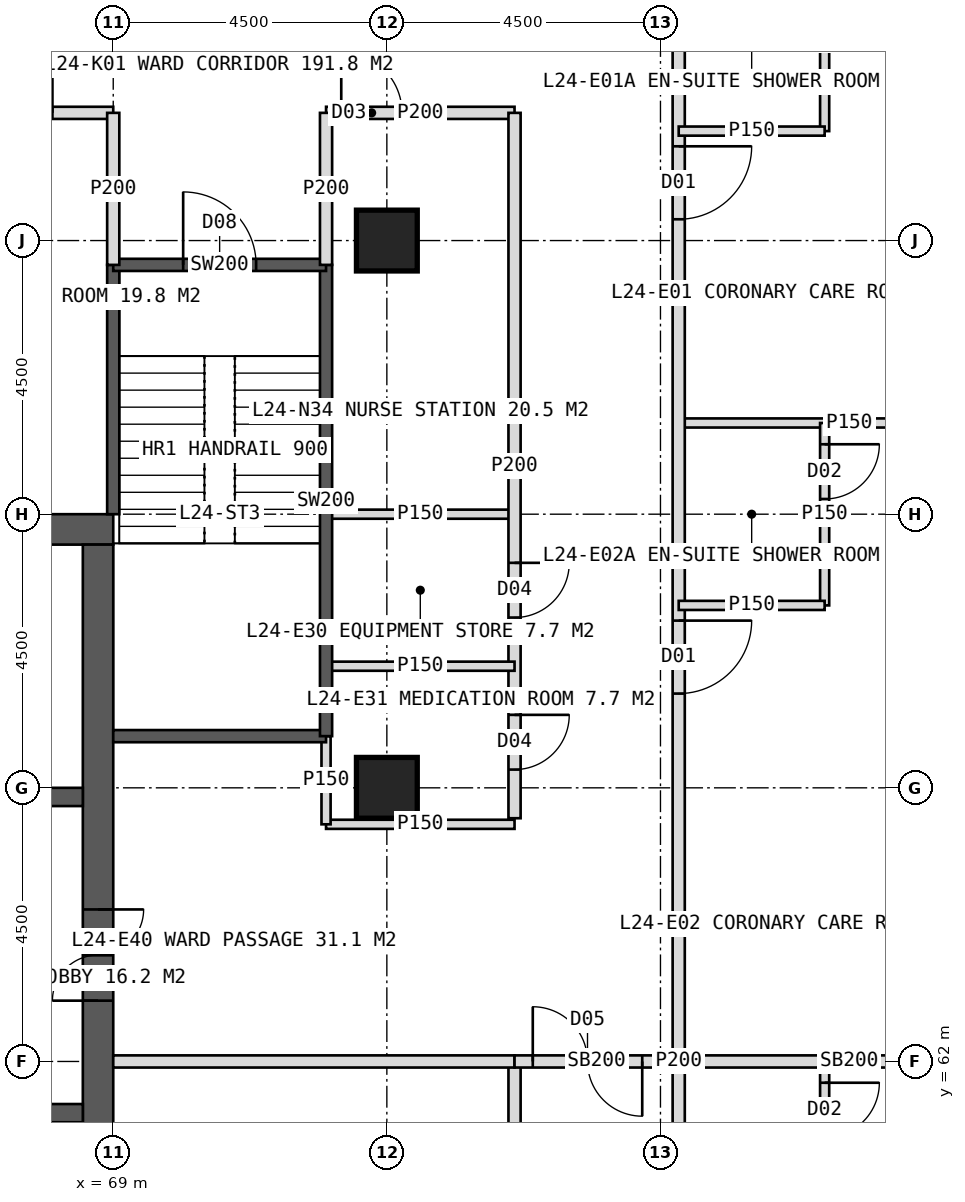
"""IFC4 building model, lengths in metres.
Left out: names, types, materials, properties, quantities, classifications, styles, units other than length and angle.
Written with IfcOpenShell. Run it as: python <this file> out.ifc"""

import sys

from ifc_helpers import new_model, si_unit, direction, frame, frame_2d, origin, origin_2d, place, context, subcontext, project, spatial, rectangle, hollow_rectangle, extrude, element, fill, save


model = new_model("IFC4")
c1 = context("Model", 3, precision=1e-05, world=origin(), true_north=direction((0.0, 1.0)))
c2 = subcontext(c1, "Body", "Model", "MODEL_VIEW")
j1 = project(units=[si_unit("LENGTHUNIT", "METRE"), si_unit("PLANEANGLEUNIT", "RADIAN")], contexts=[c1])
p1 = place(None, origin())
s1 = spatial("IfcSite", under=j1, at=p1, CompositionType="ELEMENT")
p2 = place(p1, origin())
s2 = spatial("IfcBuilding", under=s1, at=p2, CompositionType="ELEMENT")
p3 = place(p2, frame((0.0, 0.0, 104.0)))
s3 = spatial("IfcBuildingStorey", under=s2, at=p3, CompositionType="ELEMENT", Elevation=104.0)
p4 = place(p3, frame((51.0, 70.75, 0.0), z_axis=(0.0, 0.0, 1.0), x_axis=(1.0, 0.0, 0.0)))
e1 = element("IfcWall", 1, at=p4, inside=s3, PredefinedType="SHEAR", context=c2, shape_type="SweptSolid", body=[
    extrude(rectangle(XDim=18.0, YDim=0.5, at=frame_2d((9.0, 0.0))), origin(), (0.0, 0.0, 1.0), 4.0),
])
p5 = place(p4, frame((8.1, 0.0, 0.0)))
e2 = element("IfcOpeningElement", 2, at=p5, cuts=e1, PredefinedType="OPENING", context=c2, shape_type="SweptSolid", body=[
    extrude(rectangle(XDim=1.8, YDim=2.2, at=frame_2d((0.9, 1.1))), frame((0.0, 0.26, 0.0), z_axis=(0.0, -1.0, 0.0), x_axis=(1.0, 0.0, 0.0)), (0.0, 0.0, 1.0), 0.52),
])
p6 = place(p3, frame((68.75, 53.5, 0.0), z_axis=(0.0, 0.0, 1.0), x_axis=(0.0, 1.0, 0.0)))
e3 = element("IfcWall", 3, at=p6, inside=s3, PredefinedType="SHEAR", context=c2, shape_type="SweptSolid", body=[
    extrude(rectangle(XDim=17.0, YDim=0.5, at=frame_2d((8.5, 0.0))), origin(), (0.0, 0.0, 1.0), 4.0),
])
p7 = place(p6, frame((9.5, 0.0, 0.0)))
e4 = element("IfcOpeningElement", 4, at=p7, cuts=e3, PredefinedType="OPENING", context=c2, shape_type="SweptSolid", body=[
    extrude(rectangle(XDim=1.5, YDim=2.2, at=frame_2d((0.75, 1.1))), frame((0.0, 0.26, 0.0), z_axis=(0.0, -1.0, 0.0), x_axis=(1.0, 0.0, 0.0)), (0.0, 0.0, 1.0), 0.52),
])
p8 = place(p3, frame((65.2, 61.15, 0.0), z_axis=(0.0, 0.0, 1.0), x_axis=(1.0, 0.0, 0.0)))
e5 = element("IfcWall", 5, at=p8, inside=s3, PredefinedType="SHEAR", context=c2, shape_type="SweptSolid", body=[
    extrude(rectangle(XDim=3.3, YDim=0.3, at=frame_2d((1.65, 0.0))), origin(), (0.0, 0.0, 1.0), 4.0),
])
p9 = place(p8, frame((1.05, 0.0, 0.0)))
e6 = element("IfcOpeningElement", 6, at=p9, cuts=e5, PredefinedType="OPENING", context=c2, shape_type="SweptSolid", body=[
    extrude(rectangle(XDim=1.2, YDim=2.1, at=frame_2d((0.6, 1.05))), frame((0.0, 0.16, 0.0), z_axis=(0.0, -1.0, 0.0), x_axis=(1.0, 0.0, 0.0)), (0.0, 0.0, 1.0), 0.32),
])
p10 = place(p3, frame((65.2, 66.35, 0.0), z_axis=(0.0, 0.0, 1.0), x_axis=(1.0, 0.0, 0.0)))
e7 = element("IfcWall", 7, at=p10, inside=s3, PredefinedType="SHEAR", context=c2, shape_type="SweptSolid", body=[
    extrude(rectangle(XDim=3.3, YDim=0.3, at=frame_2d((1.65, 0.0))), origin(), (0.0, 0.0, 1.0), 4.0),
])
p11 = place(p10, frame((1.05, 0.0, 0.0)))
e8 = element("IfcOpeningElement", 8, at=p11, cuts=e7, PredefinedType="OPENING", context=c2, shape_type="SweptSolid", body=[
    extrude(rectangle(XDim=1.2, YDim=2.2, at=frame_2d((0.6, 1.1))), frame((0.0, 0.16, 0.0), z_axis=(0.0, -1.0, 0.0), x_axis=(1.0, 0.0, 0.0)), (0.0, 0.0, 1.0), 0.32),
])
for number, where, z_axis, x_axis in (
    (9, (73.5, 75.5, 0.0), (0.0, 0.0, 1.0), (1.0, 0.0, 0.0)),
    (10, (73.5, 66.5, 0.0), (0.0, 0.0, 1.0), (1.0, 0.0, 0.0)),
):
    element("IfcColumn", number, at=place(p3, frame(where, z_axis=z_axis, x_axis=x_axis)), inside=s3, PredefinedType="COLUMN", context=c2, shape_type="SweptSolid", body=[
        extrude(hollow_rectangle(XDim=1.0, YDim=1.0, WallThickness=0.1, at=origin_2d()), origin(), (0.0, 0.0, 1.0), 4.0),
    ])
p12 = place(p3, frame((62.25, 77.6, 0.0), z_axis=(0.0, 0.0, 1.0), x_axis=(1.0, 0.0, 0.0)))
e11 = element("IfcWall", 11, at=p12, inside=s3, PredefinedType="PARTITIONING", context=c2, shape_type="SweptSolid", body=[
    extrude(rectangle(XDim=6.75, YDim=0.2, at=frame_2d((3.375, 0.0))), origin(), (0.0, 0.0, 1.0), 3.75),
])
p13 = place(p12, frame((1.375, 0.0, 0.0)))
e12 = element("IfcOpeningElement", 12, at=p13, cuts=e11, PredefinedType="OPENING", context=c2, shape_type="SweptSolid", body=[
    extrude(rectangle(XDim=1.0, YDim=2.1, at=frame_2d((0.5, 1.05))), frame((0.0, 0.11, 0.0), z_axis=(0.0, -1.0, 0.0), x_axis=(1.0, 0.0, 0.0)), (0.0, 0.0, 1.0), 0.22),
])
p14 = place(p12, frame((4.75, 0.0, 0.0)))
e13 = element("IfcOpeningElement", 13, at=p14, cuts=e11, PredefinedType="OPENING", context=c2, shape_type="SweptSolid", body=[
    extrude(rectangle(XDim=1.0, YDim=2.1, at=frame_2d((0.5, 1.05))), frame((0.0, 0.11, 0.0), z_axis=(0.0, -1.0, 0.0), x_axis=(1.0, 0.0, 0.0)), (0.0, 0.0, 1.0), 0.22),
])
p15 = place(p3, frame((72.5, 77.6, 0.0), z_axis=(0.0, 0.0, 1.0), x_axis=(1.0, 0.0, 0.0)))
e14 = element("IfcWall", 14, at=p15, inside=s3, PredefinedType="PARTITIONING", context=c2, shape_type="SweptSolid", body=[
    extrude(rectangle(XDim=3.1, YDim=0.2, at=frame_2d((1.55, 0.0))), origin(), (0.0, 0.0, 1.0), 3.75),
])
p16 = place(p15, frame((0.25, 0.0, 0.0)))
e15 = element("IfcOpeningElement", 15, at=p16, cuts=e14, PredefinedType="OPENING", context=c2, shape_type="SweptSolid", body=[
    extrude(rectangle(XDim=1.0, YDim=2.1, at=frame_2d((0.5, 1.05))), frame((0.0, 0.11, 0.0), z_axis=(0.0, -1.0, 0.0), x_axis=(1.0, 0.0, 0.0)), (0.0, 0.0, 1.0), 0.22),
])
p17 = place(p3, frame((78.3, 72.5, 0.0), z_axis=(0.0, 0.0, 1.0), x_axis=(1.0, 0.0, 0.0)))
e16 = element("IfcWall", 16, at=p17, inside=s3, PredefinedType="PARTITIONING", context=c2, shape_type="SweptSolid", body=[
    extrude(rectangle(XDim=5.61, YDim=0.15, at=frame_2d((2.805, 0.0))), origin(), (0.0, 0.0, 1.0), 3.75),
])
p18 = place(p3, frame((78.3, 62.0, 0.0), z_axis=(0.0, 0.0, 1.0), x_axis=(1.0, 0.0, 0.0)))
e17 = element("IfcWall", 17, at=p18, inside=s3, PredefinedType="SOLIDWALL", context=c2, shape_type="SweptSolid", body=[
    extrude(rectangle(XDim=5.61, YDim=0.2, at=frame_2d((2.805, 0.0))), origin(), (0.0, 0.0, 1.0), 2.95),
])
p19 = place(p3, frame((78.3, 80.3, 0.0), z_axis=(0.0, 0.0, 1.0), x_axis=(0.0, -1.0, 0.0)))
e18 = element("IfcWall", 18, at=p19, inside=s3, PredefinedType="PARTITIONING", context=c2, shape_type="SweptSolid", body=[
    extrude(rectangle(XDim=36.6, YDim=0.2, at=frame_2d((18.3, 0.0))), origin(), (0.0, 0.0, 1.0), 3.75),
])
p20 = place(p19, frame((3.25, 0.0, 0.0)))
e19 = element("IfcOpeningElement", 19, at=p20, cuts=e18, PredefinedType="OPENING", context=c2, shape_type="SweptSolid", body=[
    extrude(rectangle(XDim=1.2, YDim=2.2, at=frame_2d((0.6, 1.1))), frame((0.0, 0.11, 0.0), z_axis=(0.0, -1.0, 0.0), x_axis=(1.0, 0.0, 0.0)), (0.0, 0.0, 1.0), 0.22),
])
p21 = place(p19, frame((11.05, 0.0, 0.0)))
e20 = element("IfcOpeningElement", 20, at=p21, cuts=e18, PredefinedType="OPENING", context=c2, shape_type="SweptSolid", body=[
    extrude(rectangle(XDim=1.2, YDim=2.2, at=frame_2d((0.6, 1.1))), frame((0.0, 0.11, 0.0), z_axis=(0.0, -1.0, 0.0), x_axis=(1.0, 0.0, 0.0)), (0.0, 0.0, 1.0), 0.22),
])
p22 = place(p19, frame((21.55, 0.0, 0.0)))
e21 = element("IfcOpeningElement", 21, at=p22, cuts=e18, PredefinedType="OPENING", context=c2, shape_type="SweptSolid", body=[
    extrude(rectangle(XDim=1.2, YDim=2.2, at=frame_2d((0.6, 1.1))), frame((0.0, 0.11, 0.0), z_axis=(0.0, -1.0, 0.0), x_axis=(1.0, 0.0, 0.0)), (0.0, 0.0, 1.0), 0.22),
])
p23 = place(p19, frame((32.05, 0.0, 0.0)))
e22 = element("IfcOpeningElement", 22, at=p23, cuts=e18, PredefinedType="OPENING", context=c2, shape_type="SweptSolid", body=[
    extrude(rectangle(XDim=1.2, YDim=2.2, at=frame_2d((0.6, 1.1))), frame((0.0, 0.11, 0.0), z_axis=(0.0, -1.0, 0.0), x_axis=(1.0, 0.0, 0.0)), (0.0, 0.0, 1.0), 0.22),
])
p24 = place(p3, frame((80.7, 80.3, 0.0), z_axis=(0.0, 0.0, 1.0), x_axis=(0.0, -1.0, 0.0)))
e23 = element("IfcWall", 23, at=p24, inside=s3, PredefinedType="PARTITIONING", context=c2, shape_type="SweptSolid", body=[
    extrude(rectangle(XDim=3.0, YDim=0.15, at=frame_2d((1.5, 0.0))), origin(), (0.0, 0.0, 1.0), 3.75),
])
p25 = place(p24, frame((0.35, 0.0, 0.0)))
e24 = element("IfcOpeningElement", 24, at=p25, cuts=e23, PredefinedType="OPENING", context=c2, shape_type="SweptSolid", body=[
    extrude(rectangle(XDim=0.9, YDim=2.1, at=frame_2d((0.45, 1.05))), frame((0.0, 0.085, 0.0), z_axis=(0.0, -1.0, 0.0), x_axis=(1.0, 0.0, 0.0)), (0.0, 0.0, 1.0), 0.17),
])
p26 = place(p3, frame((78.3, 77.3, 0.0), z_axis=(0.0, 0.0, 1.0), x_axis=(1.0, 0.0, 0.0)))
e25 = element("IfcWall", 25, at=p26, inside=s3, PredefinedType="PARTITIONING", context=c2, shape_type="SweptSolid", body=[
    extrude(rectangle(XDim=2.4, YDim=0.15, at=frame_2d((1.2, 0.0))), origin(), (0.0, 0.0, 1.0), 3.75),
])
p27 = place(p3, frame((80.7, 72.5, 0.0), z_axis=(0.0, 0.0, 1.0), x_axis=(0.0, -1.0, 0.0)))
e26 = element("IfcWall", 26, at=p27, inside=s3, PredefinedType="PARTITIONING", context=c2, shape_type="SweptSolid", body=[
    extrude(rectangle(XDim=3.0, YDim=0.15, at=frame_2d((1.5, 0.0))), origin(), (0.0, 0.0, 1.0), 3.75),
])
p28 = place(p27, frame((0.35, 0.0, 0.0)))
e27 = element("IfcOpeningElement", 27, at=p28, cuts=e26, PredefinedType="OPENING", context=c2, shape_type="SweptSolid", body=[
    extrude(rectangle(XDim=0.9, YDim=2.1, at=frame_2d((0.45, 1.05))), frame((0.0, 0.085, 0.0), z_axis=(0.0, -1.0, 0.0), x_axis=(1.0, 0.0, 0.0)), (0.0, 0.0, 1.0), 0.17),
])
p29 = place(p3, frame((78.3, 69.5, 0.0), z_axis=(0.0, 0.0, 1.0), x_axis=(1.0, 0.0, 0.0)))
e28 = element("IfcWall", 28, at=p29, inside=s3, PredefinedType="PARTITIONING", context=c2, shape_type="SweptSolid", body=[
    extrude(rectangle(XDim=2.4, YDim=0.15, at=frame_2d((1.2, 0.0))), origin(), (0.0, 0.0, 1.0), 3.75),
])
p30 = place(p3, frame((80.7, 62.0, 0.0), z_axis=(0.0, 0.0, 1.0), x_axis=(0.0, -1.0, 0.0)))
e29 = element("IfcWall", 29, at=p30, inside=s3, PredefinedType="PARTITIONING", context=c2, shape_type="SweptSolid", body=[
    extrude(rectangle(XDim=3.0, YDim=0.15, at=frame_2d((1.5, 0.0))), origin(), (0.0, 0.0, 1.0), 3.75),
])
p31 = place(p30, frame((0.35, 0.0, 0.0)))
e30 = element("IfcOpeningElement", 30, at=p31, cuts=e29, PredefinedType="OPENING", context=c2, shape_type="SweptSolid", body=[
    extrude(rectangle(XDim=0.9, YDim=2.1, at=frame_2d((0.45, 1.05))), frame((0.0, 0.085, 0.0), z_axis=(0.0, -1.0, 0.0), x_axis=(1.0, 0.0, 0.0)), (0.0, 0.0, 1.0), 0.17),
])
p32 = place(p3, frame((72.5, 71.0, 0.0), z_axis=(0.0, 0.0, 1.0), x_axis=(1.0, 0.0, 0.0)))
e31 = element("IfcWall", 31, at=p32, inside=s3, PredefinedType="PARTITIONING", context=c2, shape_type="SweptSolid", body=[
    extrude(rectangle(XDim=3.1, YDim=0.15, at=frame_2d((1.55, 0.0))), origin(), (0.0, 0.0, 1.0), 3.75),
])
p33 = place(p3, frame((75.6, 77.6, 0.0), z_axis=(0.0, 0.0, 1.0), x_axis=(0.0, -1.0, 0.0)))
e32 = element("IfcWall", 32, at=p33, inside=s3, PredefinedType="PARTITIONING", context=c2, shape_type="SweptSolid", body=[
    extrude(rectangle(XDim=11.6, YDim=0.2, at=frame_2d((5.8, 0.0))), origin(), (0.0, 0.0, 1.0), 3.75),
])
p34 = place(p33, frame((7.4, 0.0, 0.0)))
e33 = element("IfcOpeningElement", 33, at=p34, cuts=e32, PredefinedType="OPENING", context=c2, shape_type="SweptSolid", body=[
    extrude(rectangle(XDim=0.9, YDim=2.1, at=frame_2d((0.45, 1.05))), frame((0.0, 0.11, 0.0), z_axis=(0.0, -1.0, 0.0), x_axis=(1.0, 0.0, 0.0)), (0.0, 0.0, 1.0), 0.22),
])
p35 = place(p33, frame((9.9, 0.0, 0.0)))
e34 = element("IfcOpeningElement", 34, at=p35, cuts=e32, PredefinedType="OPENING", context=c2, shape_type="SweptSolid", body=[
    extrude(rectangle(XDim=0.9, YDim=2.1, at=frame_2d((0.45, 1.05))), frame((0.0, 0.11, 0.0), z_axis=(0.0, -1.0, 0.0), x_axis=(1.0, 0.0, 0.0)), (0.0, 0.0, 1.0), 0.22),
])
p36 = place(p3, frame((75.6, 62.0, 0.0), z_axis=(0.0, 0.0, 1.0), x_axis=(0.0, -1.0, 0.0)))
e35 = element("IfcWall", 35, at=p36, inside=s3, PredefinedType="PARTITIONING", context=c2, shape_type="SweptSolid", body=[
    extrude(rectangle(XDim=15.6, YDim=0.2, at=frame_2d((7.8, 0.0))), origin(), (0.0, 0.0, 1.0), 3.75),
])
p37 = place(p36, frame((2.5, 0.0, 0.0)))
e36 = element("IfcOpeningElement", 36, at=p37, cuts=e35, PredefinedType="OPENING", context=c2, shape_type="SweptSolid", body=[
    extrude(rectangle(XDim=1.0, YDim=2.1, at=frame_2d((0.5, 1.05))), frame((0.0, 0.11, 0.0), z_axis=(0.0, -1.0, 0.0), x_axis=(1.0, 0.0, 0.0)), (0.0, 0.0, 1.0), 0.22),
])
p38 = place(p36, frame((7.75, 0.0, 0.0)))
e37 = element("IfcOpeningElement", 37, at=p38, cuts=e35, PredefinedType="OPENING", context=c2, shape_type="SweptSolid", body=[
    extrude(rectangle(XDim=1.0, YDim=2.1, at=frame_2d((0.5, 1.05))), frame((0.0, 0.11, 0.0), z_axis=(0.0, -1.0, 0.0), x_axis=(1.0, 0.0, 0.0)), (0.0, 0.0, 1.0), 0.22),
])
p39 = place(p36, frame((12.55, 0.0, 0.0)))
e38 = element("IfcOpeningElement", 38, at=p39, cuts=e35, PredefinedType="OPENING", context=c2, shape_type="SweptSolid", body=[
    extrude(rectangle(XDim=1.0, YDim=2.1, at=frame_2d((0.5, 1.05))), frame((0.0, 0.11, 0.0), z_axis=(0.0, -1.0, 0.0), x_axis=(1.0, 0.0, 0.0)), (0.0, 0.0, 1.0), 0.22),
])
p40 = place(p3, frame((72.5, 65.9, 0.0), z_axis=(0.0, 0.0, 1.0), x_axis=(1.0, 0.0, 0.0)))
e39 = element("IfcWall", 39, at=p40, inside=s3, PredefinedType="PARTITIONING", context=c2, shape_type="SweptSolid", body=[
    extrude(rectangle(XDim=3.1, YDim=0.15, at=frame_2d((1.55, 0.0))), origin(), (0.0, 0.0, 1.0), 3.75),
])
p41 = place(p3, frame((69.0, 62.0, 0.0), z_axis=(0.0, 0.0, 1.0), x_axis=(1.0, 0.0, 0.0)))
e40 = element("IfcWall", 40, at=p41, inside=s3, PredefinedType="SOLIDWALL", context=c2, shape_type="SweptSolid", body=[
    extrude(rectangle(XDim=6.6, YDim=0.2, at=frame_2d((3.3, 0.0))), origin(), (0.0, 0.0, 1.0), 2.95),
])
p42 = place(p3, frame((72.5, 68.5, 0.0), z_axis=(0.0, 0.0, 1.0), x_axis=(1.0, 0.0, 0.0)))
e41 = element("IfcWall", 41, at=p42, inside=s3, PredefinedType="PARTITIONING", context=c2, shape_type="SweptSolid", body=[
    extrude(rectangle(XDim=3.1, YDim=0.15, at=frame_2d((1.55, 0.0))), origin(), (0.0, 0.0, 1.0), 3.75),
])
p43 = place(p3, frame((75.6, 62.0, 0.0), z_axis=(0.0, 0.0, 1.0), x_axis=(1.0, 0.0, 0.0)))
e42 = element("IfcWall", 42, at=p43, inside=s3, PredefinedType="SOLIDWALL", context=c2, shape_type="SweptSolid", body=[
    extrude(rectangle(XDim=2.7, YDim=0.2, at=frame_2d((1.35, 0.0))), origin(), (0.0, 0.0, 1.0), 2.95),
])
p44 = place(p43, frame((0.3, 0.0, 0.0)))
e43 = element("IfcOpeningElement", 43, at=p44, cuts=e42, PredefinedType="OPENING", context=c2, shape_type="SweptSolid", body=[
    extrude(rectangle(XDim=1.8, YDim=2.2, at=frame_2d((0.9, 1.1))), frame((0.0, 0.11, 0.0), z_axis=(0.0, -1.0, 0.0), x_axis=(1.0, 0.0, 0.0)), (0.0, 0.0, 1.0), 0.22),
])
p45 = place(p3, frame((72.5, 65.9, 0.0), z_axis=(0.0, 0.0, 1.0), x_axis=(0.0, 1.0, 0.0)))
e44 = element("IfcWall", 44, at=p45, inside=s3, PredefinedType="PARTITIONING", context=c2, shape_type="SweptSolid", body=[
    extrude(rectangle(XDim=1.45, YDim=0.15, at=frame_2d((0.725, 0.0))), origin(), (0.0, 0.0, 1.0), 3.75),
])
p46 = place(p3, frame((69.0, 71.0, 0.0), z_axis=(0.0, 0.0, 1.0), x_axis=(0.0, 1.0, 0.0)))
e45 = element("IfcWall", 45, at=p46, inside=s3, PredefinedType="SOLIDWALL", context=c2, shape_type="SweptSolid", body=[
    extrude(rectangle(XDim=4.1, YDim=0.2, at=frame_2d((2.05, 0.0))), origin(), (0.0, 0.0, 1.0), 3.75),
])
p47 = place(p3, frame((69.0, 67.35, 0.0), z_axis=(0.0, 0.0, 1.0), x_axis=(1.0, 0.0, 0.0)))
e46 = element("IfcWall", 46, at=p47, inside=s3, PredefinedType="SOLIDWALL", context=c2, shape_type="SweptSolid", body=[
    extrude(rectangle(XDim=3.5, YDim=0.2, at=frame_2d((1.75, 0.0))), origin(), (0.0, 0.0, 1.0), 3.75),
])
p48 = place(p3, frame((72.5, 67.35, 0.0), z_axis=(0.0, 0.0, 1.0), x_axis=(0.0, 1.0, 0.0)))
e47 = element("IfcWall", 47, at=p48, inside=s3, PredefinedType="SOLIDWALL", context=c2, shape_type="SweptSolid", body=[
    extrude(rectangle(XDim=7.75, YDim=0.2, at=frame_2d((3.875, 0.0))), origin(), (0.0, 0.0, 1.0), 3.75),
])
p49 = place(p3, frame((69.0, 75.1, 0.0), z_axis=(0.0, 0.0, 1.0), x_axis=(1.0, 0.0, 0.0)))
e48 = element("IfcWall", 48, at=p49, inside=s3, PredefinedType="SOLIDWALL", context=c2, shape_type="SweptSolid", body=[
    extrude(rectangle(XDim=3.5, YDim=0.2, at=frame_2d((1.75, 0.0))), origin(), (0.0, 0.0, 1.0), 3.75),
])
p50 = place(p49, frame((1.15, 0.0, 0.0)))
e49 = element("IfcOpeningElement", 49, at=p50, cuts=e48, PredefinedType="OPENING", context=c2, shape_type="SweptSolid", body=[
    extrude(rectangle(XDim=1.2, YDim=2.1, at=frame_2d((0.6, 1.05))), frame((0.0, 0.11, 0.0), z_axis=(0.0, -1.0, 0.0), x_axis=(1.0, 0.0, 0.0)), (0.0, 0.0, 1.0), 0.22),
])
for number, where, z_axis, x_axis in (
    (50, (69.0, 75.1, 0.0), (0.0, 0.0, 1.0), (0.0, 1.0, 0.0)),
    (51, (72.5, 75.1, 0.0), (0.0, 0.0, 1.0), (0.0, 1.0, 0.0)),
):
    element("IfcWall", number, at=place(p3, frame(where, z_axis=z_axis, x_axis=x_axis)), inside=s3, PredefinedType="PARTITIONING", context=c2, shape_type="SweptSolid", body=[
        extrude(rectangle(XDim=2.5, YDim=0.2, at=frame_2d((1.25, 0.0))), origin(), (0.0, 0.0, 1.0), 3.75),
    ])
p51 = place(p16, origin())
e52 = element("IfcDoor", 52, at=p51, inside=s3, OperationType="SINGLE_SWING_LEFT", PredefinedType="DOOR", context=c2, shape_type="SweptSolid", body=[
    extrude(rectangle(XDim=1.0, YDim=2.1, at=frame_2d((0.5, 1.05))), frame((0.0, 0.025, 0.0), z_axis=(0.0, -1.0, 0.0), x_axis=(1.0, 0.0, 0.0)), (0.0, 0.0, 1.0), 0.05),
])
fill(e15, e52)
p52 = place(p20, origin())
e53 = element("IfcDoor", 53, at=p52, inside=s3, OperationType="SINGLE_SWING_LEFT", PredefinedType="DOOR", context=c2, shape_type="SweptSolid", body=[
    extrude(rectangle(XDim=1.2, YDim=2.2, at=frame_2d((0.6, 1.1))), frame((0.0, 0.025, 0.0), z_axis=(0.0, -1.0, 0.0), x_axis=(1.0, 0.0, 0.0)), (0.0, 0.0, 1.0), 0.05),
])
fill(e19, e53)
p53 = place(p21, origin())
e54 = element("IfcDoor", 54, at=p53, inside=s3, OperationType="SINGLE_SWING_LEFT", PredefinedType="DOOR", context=c2, shape_type="SweptSolid", body=[
    extrude(rectangle(XDim=1.2, YDim=2.2, at=frame_2d((0.6, 1.1))), frame((0.0, 0.025, 0.0), z_axis=(0.0, -1.0, 0.0), x_axis=(1.0, 0.0, 0.0)), (0.0, 0.0, 1.0), 0.05),
])
fill(e20, e54)
p54 = place(p28, origin())
e55 = element("IfcDoor", 55, at=p54, inside=s3, OperationType="SINGLE_SWING_LEFT", PredefinedType="DOOR", context=c2, shape_type="SweptSolid", body=[
    extrude(rectangle(XDim=0.9, YDim=2.1, at=frame_2d((0.45, 1.05))), frame((0.0, 0.025, 0.0), z_axis=(0.0, -1.0, 0.0), x_axis=(1.0, 0.0, 0.0)), (0.0, 0.0, 1.0), 0.05),
])
fill(e27, e55)
p55 = place(p31, origin())
e56 = element("IfcDoor", 56, at=p55, inside=s3, OperationType="SINGLE_SWING_LEFT", PredefinedType="DOOR", context=c2, shape_type="SweptSolid", body=[
    extrude(rectangle(XDim=0.9, YDim=2.1, at=frame_2d((0.45, 1.05))), frame((0.0, 0.025, 0.0), z_axis=(0.0, -1.0, 0.0), x_axis=(1.0, 0.0, 0.0)), (0.0, 0.0, 1.0), 0.05),
])
fill(e30, e56)
p56 = place(p34, origin())
e57 = element("IfcDoor", 57, at=p56, inside=s3, OperationType="SINGLE_SWING_LEFT", PredefinedType="DOOR", context=c2, shape_type="SweptSolid", body=[
    extrude(rectangle(XDim=0.9, YDim=2.1, at=frame_2d((0.45, 1.05))), frame((0.0, 0.025, 0.0), z_axis=(0.0, -1.0, 0.0), x_axis=(1.0, 0.0, 0.0)), (0.0, 0.0, 1.0), 0.05),
])
fill(e33, e57)
p57 = place(p35, origin())
e58 = element("IfcDoor", 58, at=p57, inside=s3, OperationType="SINGLE_SWING_LEFT", PredefinedType="DOOR", context=c2, shape_type="SweptSolid", body=[
    extrude(rectangle(XDim=0.9, YDim=2.1, at=frame_2d((0.45, 1.05))), frame((0.0, 0.025, 0.0), z_axis=(0.0, -1.0, 0.0), x_axis=(1.0, 0.0, 0.0)), (0.0, 0.0, 1.0), 0.05),
])
fill(e34, e58)
p58 = place(p44, origin())
e59 = element("IfcDoor", 59, at=p58, inside=s3, OperationType="DOUBLE_DOOR_DOUBLE_SWING", PredefinedType="DOOR", context=c2, shape_type="SweptSolid", body=[
    extrude(rectangle(XDim=1.8, YDim=2.2, at=frame_2d((0.9, 1.1))), frame((0.0, 0.025, 0.0), z_axis=(0.0, -1.0, 0.0), x_axis=(1.0, 0.0, 0.0)), (0.0, 0.0, 1.0), 0.05),
])
fill(e43, e59)
p59 = place(p7, origin())
e60 = element("IfcDoor", 60, at=p59, inside=s3, OperationType="DOUBLE_DOOR_SINGLE_SWING", PredefinedType="DOOR", context=c2, shape_type="SweptSolid", body=[
    extrude(rectangle(XDim=1.5, YDim=2.2, at=frame_2d((0.75, 1.1))), frame((0.0, 0.025, 0.0), z_axis=(0.0, -1.0, 0.0), x_axis=(1.0, 0.0, 0.0)), (0.0, 0.0, 1.0), 0.05),
])
fill(e4, e60)
p60 = place(p50, origin())
e61 = element("IfcDoor", 61, at=p60, inside=s3, OperationType="SINGLE_SWING_LEFT", PredefinedType="DOOR", context=c2, shape_type="SweptSolid", body=[
    extrude(rectangle(XDim=1.2, YDim=2.1, at=frame_2d((0.6, 1.05))), frame((0.0, 0.025, 0.0), z_axis=(0.0, -1.0, 0.0), x_axis=(1.0, 0.0, 0.0)), (0.0, 0.0, 1.0), 0.05),
])
fill(e49, e61)
save(model, sys.argv[1])
